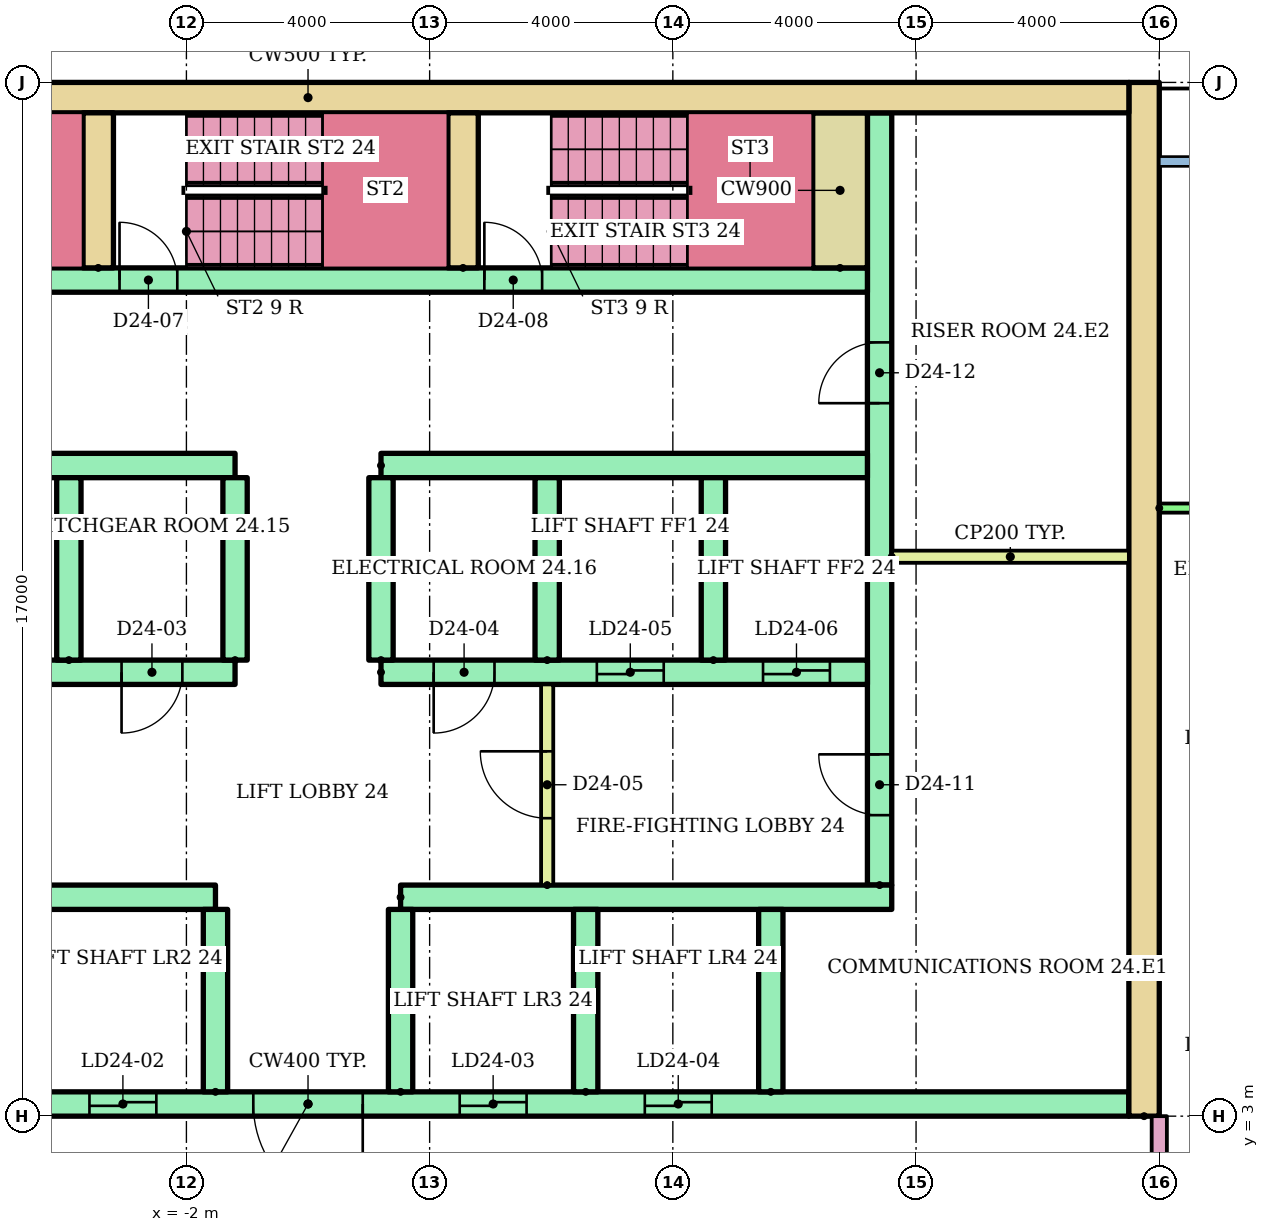
"""IFC4 building model, lengths in metres.
Left out: names, types, materials, properties, quantities, classifications, styles, units other than length and angle.
Written with IfcOpenShell. Run it as: python <this file> out.ifc"""

import sys

from ifc_helpers import new_model, si_unit, direction, frame, frame_2d, origin, place, context, subcontext, project, spatial, rectangle, extrude, element, fill, save


model = new_model("IFC4")
c1 = context("Model", 3, precision=1e-05, world=origin(), true_north=direction((0.0, 1.0)))
c2 = subcontext(c1, "Body", "Model", "MODEL_VIEW")
j1 = project(units=[si_unit("LENGTHUNIT", "METRE"), si_unit("PLANEANGLEUNIT", "RADIAN")], contexts=[c1])
p1 = place(None, origin())
s1 = spatial("IfcSite", under=j1, at=p1, CompositionType="ELEMENT")
p2 = place(p1, origin())
s2 = spatial("IfcBuilding", under=s1, at=p2, CompositionType="ELEMENT")
p3 = place(p2, frame((0.0, 0.0, 93.5)))
s3 = spatial("IfcBuildingStorey", under=s2, at=p3, CompositionType="ELEMENT", Elevation=93.5)
p4 = place(p3, frame((13.75, 3.0, 0.0), z_axis=(0.0, 0.0, 1.0), x_axis=(0.0, 1.0, 0.0)))
e1 = element("IfcWall", 1, at=p4, inside=s3, PredefinedType="SHEAR", context=c2, shape_type="SweptSolid", body=[
    extrude(rectangle(XDim=17.0, YDim=0.5, at=frame_2d((8.5, 0.0))), origin(), (0.0, 0.0, 1.0), 2.92),
])
p5 = place(p3, frame((-13.5, 19.75, 0.0)))
e2 = element("IfcWall", 2, at=p5, inside=s3, PredefinedType="SHEAR", context=c2, shape_type="SweptSolid", body=[
    extrude(rectangle(XDim=27.0, YDim=0.5, at=frame_2d((13.5, 0.0))), origin(), (0.0, 0.0, 1.0), 2.92),
])
p6 = place(p3, frame((9.4, 6.8, 0.0), z_axis=(0.0, 0.0, 1.0), x_axis=(0.0, 1.0, 0.0)))
e3 = element("IfcWall", 3, at=p6, inside=s3, PredefinedType="SHEAR", context=c2, shape_type="SweptSolid", body=[
    extrude(rectangle(XDim=12.7, YDim=0.4, at=frame_2d((6.35, 0.0))), origin(), (0.0, 0.0, 1.0), 2.92),
])
p7 = place(p6, frame((1.15, 0.0, 0.0)))
e4 = element("IfcOpeningElement", 4, at=p7, cuts=e3, PredefinedType="OPENING", context=c2, shape_type="SweptSolid", body=[
    extrude(rectangle(XDim=1.0, YDim=2.1, at=frame_2d((0.5, 1.05))), frame((0.0, 0.21, 0.0), z_axis=(0.0, -1.0, 0.0), x_axis=(1.0, 0.0, 0.0)), (0.0, 0.0, 1.0), 0.42),
])
p8 = place(p6, frame((7.925, 0.0, 0.0)))
e5 = element("IfcOpeningElement", 5, at=p8, cuts=e3, PredefinedType="OPENING", context=c2, shape_type="SweptSolid", body=[
    extrude(rectangle(XDim=1.0, YDim=2.1, at=frame_2d((0.5, 1.05))), frame((0.0, 0.21, 0.0), z_axis=(0.0, -1.0, 0.0), x_axis=(1.0, 0.0, 0.0)), (0.0, 0.0, 1.0), 0.42),
])
p9 = place(p3, frame((-13.5, 3.2, 0.0)))
e6 = element("IfcWall", 6, at=p9, inside=s3, PredefinedType="SHEAR", context=c2, shape_type="SweptSolid", body=[
    extrude(rectangle(XDim=27.0, YDim=0.4, at=frame_2d((13.5, 0.0))), origin(), (0.0, 0.0, 1.0), 2.92),
])
p10 = place(p9, frame((6.861, 0.0, 0.0)))
e7 = element("IfcOpeningElement", 7, at=p10, cuts=e6, PredefinedType="OPENING", context=c2, shape_type="SweptSolid", body=[
    extrude(rectangle(XDim=1.1, YDim=2.1, at=frame_2d((0.55, 1.05))), frame((0.0, 0.21, 0.0), z_axis=(0.0, -1.0, 0.0), x_axis=(1.0, 0.0, 0.0)), (0.0, 0.0, 1.0), 0.42),
])
p11 = place(p9, frame((9.906, 0.0, 0.0)))
e8 = element("IfcOpeningElement", 8, at=p11, cuts=e6, PredefinedType="OPENING", context=c2, shape_type="SweptSolid", body=[
    extrude(rectangle(XDim=1.1, YDim=2.1, at=frame_2d((0.55, 1.05))), frame((0.0, 0.21, 0.0), z_axis=(0.0, -1.0, 0.0), x_axis=(1.0, 0.0, 0.0)), (0.0, 0.0, 1.0), 0.42),
])
p12 = place(p9, frame((15.994, 0.0, 0.0)))
e9 = element("IfcOpeningElement", 9, at=p12, cuts=e6, PredefinedType="OPENING", context=c2, shape_type="SweptSolid", body=[
    extrude(rectangle(XDim=1.1, YDim=2.1, at=frame_2d((0.55, 1.05))), frame((0.0, 0.21, 0.0), z_axis=(0.0, -1.0, 0.0), x_axis=(1.0, 0.0, 0.0)), (0.0, 0.0, 1.0), 0.42),
])
p13 = place(p9, frame((19.039, 0.0, 0.0)))
e10 = element("IfcOpeningElement", 10, at=p13, cuts=e6, PredefinedType="OPENING", context=c2, shape_type="SweptSolid", body=[
    extrude(rectangle(XDim=1.1, YDim=2.1, at=frame_2d((0.55, 1.05))), frame((0.0, 0.21, 0.0), z_axis=(0.0, -1.0, 0.0), x_axis=(1.0, 0.0, 0.0)), (0.0, 0.0, 1.0), 0.42),
])
p14 = place(p9, frame((12.6, 0.0, 0.0)))
e11 = element("IfcOpeningElement", 11, at=p14, cuts=e6, PredefinedType="OPENING", context=c2, shape_type="SweptSolid", body=[
    extrude(rectangle(XDim=1.8, YDim=2.1, at=frame_2d((0.9, 1.05))), frame((0.0, 0.21, 0.0), z_axis=(0.0, -1.0, 0.0), x_axis=(1.0, 0.0, 0.0)), (0.0, 0.0, 1.0), 0.42),
])
p15 = place(p3, frame((-13.5, 6.6, 0.0)))
e12 = element("IfcWall", 12, at=p15, inside=s3, PredefinedType="SHEAR", context=c2, shape_type="SweptSolid", body=[
    extrude(rectangle(XDim=11.978, YDim=0.4, at=frame_2d((5.989, 0.0))), origin(), (0.0, 0.0, 1.0), 2.92),
])
p16 = place(p3, frame((1.522, 6.6, 0.0)))
e13 = element("IfcWall", 13, at=p16, inside=s3, PredefinedType="SHEAR", context=c2, shape_type="SweptSolid", body=[
    extrude(rectangle(XDim=8.078, YDim=0.4, at=frame_2d((4.039, 0.0))), origin(), (0.0, 0.0, 1.0), 2.92),
])
for number, where, z_axis, x_axis in (
    (14, (-1.522, 3.4, 0.0), (0.0, 0.0, 1.0), (0.0, 1.0, 0.0)),
    (15, (1.522, 3.4, 0.0), (0.0, 0.0, 1.0), (0.0, 1.0, 0.0)),
    (16, (4.567, 3.4, 0.0), (0.0, 0.0, 1.0), (0.0, 1.0, 0.0)),
    (17, (7.611, 3.4, 0.0), (0.0, 0.0, 1.0), (0.0, 1.0, 0.0)),
):
    element("IfcWall", number, at=place(p3, frame(where, z_axis=z_axis, x_axis=x_axis)), inside=s3, PredefinedType="SHEAR", context=c2, shape_type="SweptSolid", body=[
        extrude(rectangle(XDim=3.0, YDim=0.4, at=frame_2d((1.5, 0.0))), origin(), (0.0, 0.0, 1.0), 2.92),
    ])
p17 = place(p3, frame((-9.2, 10.3, 0.0)))
e18 = element("IfcWall", 18, at=p17, inside=s3, PredefinedType="SHEAR", context=c2, shape_type="SweptSolid", body=[
    extrude(rectangle(XDim=8.0, YDim=0.4, at=frame_2d((4.0, 0.0))), origin(), (0.0, 0.0, 1.0), 2.92),
])
p18 = place(p17, frame((2.033, 0.0, 0.0)))
e19 = element("IfcOpeningElement", 19, at=p18, cuts=e18, PredefinedType="OPENING", context=c2, shape_type="SweptSolid", body=[
    extrude(rectangle(XDim=1.0, YDim=2.1, at=frame_2d((0.5, 1.05))), frame((0.0, 0.21, 0.0), z_axis=(0.0, -1.0, 0.0), x_axis=(1.0, 0.0, 0.0)), (0.0, 0.0, 1.0), 0.42),
])
p19 = place(p17, frame((6.133, 0.0, 0.0)))
e20 = element("IfcOpeningElement", 20, at=p19, cuts=e18, PredefinedType="OPENING", context=c2, shape_type="SweptSolid", body=[
    extrude(rectangle(XDim=1.0, YDim=2.1, at=frame_2d((0.5, 1.05))), frame((0.0, 0.21, 0.0), z_axis=(0.0, -1.0, 0.0), x_axis=(1.0, 0.0, 0.0)), (0.0, 0.0, 1.0), 0.42),
])
p20 = place(p3, frame((-9.2, 13.7, 0.0)))
e21 = element("IfcWall", 21, at=p20, inside=s3, PredefinedType="SHEAR", context=c2, shape_type="SweptSolid", body=[
    extrude(rectangle(XDim=8.0, YDim=0.4, at=frame_2d((4.0, 0.0))), origin(), (0.0, 0.0, 1.0), 2.92),
])
p21 = place(p3, frame((1.2, 10.3, 0.0)))
e22 = element("IfcWall", 22, at=p21, inside=s3, PredefinedType="SHEAR", context=c2, shape_type="SweptSolid", body=[
    extrude(rectangle(XDim=8.0, YDim=0.4, at=frame_2d((4.0, 0.0))), origin(), (0.0, 0.0, 1.0), 2.92),
])
p22 = place(p21, frame((3.55, 0.0, 0.0)))
e23 = element("IfcOpeningElement", 23, at=p22, cuts=e22, PredefinedType="OPENING", context=c2, shape_type="SweptSolid", body=[
    extrude(rectangle(XDim=1.1, YDim=2.1, at=frame_2d((0.55, 1.05))), frame((0.0, 0.21, 0.0), z_axis=(0.0, -1.0, 0.0), x_axis=(1.0, 0.0, 0.0)), (0.0, 0.0, 1.0), 0.42),
])
p23 = place(p21, frame((6.283, 0.0, 0.0)))
e24 = element("IfcOpeningElement", 24, at=p23, cuts=e22, PredefinedType="OPENING", context=c2, shape_type="SweptSolid", body=[
    extrude(rectangle(XDim=1.1, YDim=2.1, at=frame_2d((0.55, 1.05))), frame((0.0, 0.21, 0.0), z_axis=(0.0, -1.0, 0.0), x_axis=(1.0, 0.0, 0.0)), (0.0, 0.0, 1.0), 0.42),
])
p24 = place(p21, frame((0.867, 0.0, 0.0)))
e25 = element("IfcOpeningElement", 25, at=p24, cuts=e22, PredefinedType="OPENING", context=c2, shape_type="SweptSolid", body=[
    extrude(rectangle(XDim=1.0, YDim=2.1, at=frame_2d((0.5, 1.05))), frame((0.0, 0.21, 0.0), z_axis=(0.0, -1.0, 0.0), x_axis=(1.0, 0.0, 0.0)), (0.0, 0.0, 1.0), 0.42),
])
p25 = place(p3, frame((1.2, 13.7, 0.0)))
e26 = element("IfcWall", 26, at=p25, inside=s3, PredefinedType="SHEAR", context=c2, shape_type="SweptSolid", body=[
    extrude(rectangle(XDim=8.0, YDim=0.4, at=frame_2d((4.0, 0.0))), origin(), (0.0, 0.0, 1.0), 2.92),
])
for number, where, z_axis, x_axis in (
    (27, (-3.933, 10.5, 0.0), (0.0, 0.0, 1.0), (0.0, 1.0, 0.0)),
    (28, (-1.2, 10.5, 0.0), (0.0, 0.0, 1.0), (0.0, 1.0, 0.0)),
    (29, (1.2, 10.5, 0.0), (0.0, 0.0, 1.0), (0.0, 1.0, 0.0)),
    (30, (3.933, 10.5, 0.0), (0.0, 0.0, 1.0), (0.0, 1.0, 0.0)),
    (31, (6.667, 10.5, 0.0), (0.0, 0.0, 1.0), (0.0, 1.0, 0.0)),
):
    element("IfcWall", number, at=place(p3, frame(where, z_axis=z_axis, x_axis=x_axis)), inside=s3, PredefinedType="SHEAR", context=c2, shape_type="SweptSolid", body=[
        extrude(rectangle(XDim=3.0, YDim=0.4, at=frame_2d((1.5, 0.0))), origin(), (0.0, 0.0, 1.0), 2.92),
    ])
p26 = place(p3, frame((3.933, 6.8, 0.0), z_axis=(0.0, 0.0, 1.0), x_axis=(0.0, 1.0, 0.0)))
e32 = element("IfcWall", 32, at=p26, inside=s3, PredefinedType="PARTITIONING", context=c2, shape_type="SweptSolid", body=[
    extrude(rectangle(XDim=3.3, YDim=0.2, at=frame_2d((1.65, 0.0))), origin(), (0.0, 0.0, 1.0), 2.92),
])
p27 = place(p26, frame((1.1, 0.0, 0.0)))
e33 = element("IfcOpeningElement", 33, at=p27, cuts=e32, PredefinedType="OPENING", context=c2, shape_type="SweptSolid", body=[
    extrude(rectangle(XDim=1.1, YDim=2.1, at=frame_2d((0.55, 1.05))), frame((0.0, 0.11, 0.0), z_axis=(0.0, -1.0, 0.0), x_axis=(1.0, 0.0, 0.0)), (0.0, 0.0, 1.0), 0.22),
])
p28 = place(p3, frame((-9.2, 16.75, 0.0)))
e34 = element("IfcWall", 34, at=p28, inside=s3, PredefinedType="SHEAR", context=c2, shape_type="SweptSolid", body=[
    extrude(rectangle(XDim=18.4, YDim=0.4, at=frame_2d((9.2, 0.0))), origin(), (0.0, 0.0, 1.0), 2.92),
])
p29 = place(p28, frame((0.1, 0.0, 0.0)))
e35 = element("IfcOpeningElement", 35, at=p29, cuts=e34, PredefinedType="OPENING", context=c2, shape_type="SweptSolid", body=[
    extrude(rectangle(XDim=0.95, YDim=2.1, at=frame_2d((0.475, 1.05))), frame((0.0, 0.21, 0.0), z_axis=(0.0, -1.0, 0.0), x_axis=(1.0, 0.0, 0.0)), (0.0, 0.0, 1.0), 0.42),
])
p30 = place(p28, frame((6.1, 0.0, 0.0)))
e36 = element("IfcOpeningElement", 36, at=p30, cuts=e34, PredefinedType="OPENING", context=c2, shape_type="SweptSolid", body=[
    extrude(rectangle(XDim=0.95, YDim=2.1, at=frame_2d((0.475, 1.05))), frame((0.0, 0.21, 0.0), z_axis=(0.0, -1.0, 0.0), x_axis=(1.0, 0.0, 0.0)), (0.0, 0.0, 1.0), 0.42),
])
p31 = place(p28, frame((12.1, 0.0, 0.0)))
e37 = element("IfcOpeningElement", 37, at=p31, cuts=e34, PredefinedType="OPENING", context=c2, shape_type="SweptSolid", body=[
    extrude(rectangle(XDim=0.95, YDim=2.1, at=frame_2d((0.475, 1.05))), frame((0.0, 0.21, 0.0), z_axis=(0.0, -1.0, 0.0), x_axis=(1.0, 0.0, 0.0)), (0.0, 0.0, 1.0), 0.42),
])
for number, where, z_axis, x_axis in (
    (38, (-3.45, 16.95, 0.0), (0.0, 0.0, 1.0), (0.0, 1.0, 0.0)),
    (39, (2.55, 16.95, 0.0), (0.0, 0.0, 1.0), (0.0, 1.0, 0.0)),
):
    element("IfcWall", number, at=place(p3, frame(where, z_axis=z_axis, x_axis=x_axis)), inside=s3, PredefinedType="SHEAR", context=c2, shape_type="SweptSolid", body=[
        extrude(rectangle(XDim=2.55, YDim=0.5, at=frame_2d((1.275, 0.0))), origin(), (0.0, 0.0, 1.0), 2.92),
    ])
p32 = place(p3, frame((8.75, 16.95, 0.0), z_axis=(0.0, 0.0, 1.0), x_axis=(0.0, 1.0, 0.0)))
e40 = element("IfcWall", 40, at=p32, inside=s3, PredefinedType="SHEAR", context=c2, shape_type="SweptSolid", body=[
    extrude(rectangle(XDim=2.55, YDim=0.9, at=frame_2d((1.275, 0.0))), origin(), (0.0, 0.0, 1.0), 2.92),
])
p33 = place(p3, frame((9.6, 12.2, 0.0)))
e41 = element("IfcWall", 41, at=p33, inside=s3, PredefinedType="PARTITIONING", context=c2, shape_type="SweptSolid", body=[
    extrude(rectangle(XDim=3.9, YDim=0.2, at=frame_2d((1.95, 0.0))), origin(), (0.0, 0.0, 1.0), 2.92),
])
p34 = place(p3, frame((14.0, 13.0, 0.0)))
e42 = element("IfcWall", 42, at=p34, inside=s3, PredefinedType="PARTITIONING", context=c2, shape_type="SweptSolid", body=[
    extrude(rectangle(XDim=12.0, YDim=0.15, at=frame_2d((6.0, 0.0))), origin(), (0.0, 0.0, 1.0), 2.4),
])
p35 = place(p34, frame((1.5, 0.0, 0.0)))
e43 = element("IfcOpeningElement", 43, at=p35, cuts=e42, PredefinedType="OPENING", context=c2, shape_type="SweptSolid", body=[
    extrude(rectangle(XDim=1.0, YDim=2.1, at=frame_2d((0.5, 1.05))), frame((0.0, 0.085, 0.0), z_axis=(0.0, -1.0, 0.0), x_axis=(1.0, 0.0, 0.0)), (0.0, 0.0, 1.0), 0.17),
])
p36 = place(p34, frame((7.5, 0.0, 0.0)))
e44 = element("IfcOpeningElement", 44, at=p36, cuts=e42, PredefinedType="OPENING", context=c2, shape_type="SweptSolid", body=[
    extrude(rectangle(XDim=1.0, YDim=2.1, at=frame_2d((0.5, 1.05))), frame((0.0, 0.085, 0.0), z_axis=(0.0, -1.0, 0.0), x_axis=(1.0, 0.0, 0.0)), (0.0, 0.0, 1.0), 0.17),
])
p37 = place(p3, frame((14.0, 1.4, 0.0), z_axis=(0.0, 0.0, 1.0), x_axis=(0.0, 1.0, 0.0)))
e45 = element("IfcWall", 45, at=p37, inside=s3, PredefinedType="PARTITIONING", context=c2, shape_type="SweptSolid", body=[
    extrude(rectangle(XDim=1.6, YDim=0.25, at=frame_2d((0.8, 0.0))), origin(), (0.0, 0.0, 1.0), 2.4),
])
p38 = place(p11, origin())
e46 = element("IfcDoor", 46, at=p38, inside=s3, OperationType="SLIDING_TO_LEFT", PredefinedType="DOOR", context=c2, shape_type="SweptSolid", body=[
    extrude(rectangle(XDim=1.1, YDim=2.1, at=frame_2d((0.55, 1.05))), frame((0.0, 0.025, 0.0), z_axis=(0.0, -1.0, 0.0), x_axis=(1.0, 0.0, 0.0)), (0.0, 0.0, 1.0), 0.05),
])
fill(e8, e46)
p39 = place(p12, origin())
e47 = element("IfcDoor", 47, at=p39, inside=s3, OperationType="SLIDING_TO_LEFT", PredefinedType="DOOR", context=c2, shape_type="SweptSolid", body=[
    extrude(rectangle(XDim=1.1, YDim=2.1, at=frame_2d((0.55, 1.05))), frame((0.0, 0.025, 0.0), z_axis=(0.0, -1.0, 0.0), x_axis=(1.0, 0.0, 0.0)), (0.0, 0.0, 1.0), 0.05),
])
fill(e9, e47)
p40 = place(p13, origin())
e48 = element("IfcDoor", 48, at=p40, inside=s3, OperationType="SLIDING_TO_LEFT", PredefinedType="DOOR", context=c2, shape_type="SweptSolid", body=[
    extrude(rectangle(XDim=1.1, YDim=2.1, at=frame_2d((0.55, 1.05))), frame((0.0, 0.025, 0.0), z_axis=(0.0, -1.0, 0.0), x_axis=(1.0, 0.0, 0.0)), (0.0, 0.0, 1.0), 0.05),
])
fill(e10, e48)
p41 = place(p14, frame((1.8, 0.0, 0.0), z_axis=(0.0, 0.0, 1.0), x_axis=(-1.0, 0.0, 0.0)))
e49 = element("IfcDoor", 49, at=p41, inside=s3, OperationType="DOUBLE_DOOR_SINGLE_SWING", PredefinedType="DOOR", context=c2, shape_type="SweptSolid", body=[
    extrude(rectangle(XDim=1.8, YDim=2.1, at=frame_2d((0.9, 1.05))), frame((0.0, 0.025, 0.0), z_axis=(0.0, -1.0, 0.0), x_axis=(1.0, 0.0, 0.0)), (0.0, 0.0, 1.0), 0.05),
])
fill(e11, e49)
p42 = place(p22, origin())
e50 = element("IfcDoor", 50, at=p42, inside=s3, OperationType="SLIDING_TO_LEFT", PredefinedType="DOOR", context=c2, shape_type="SweptSolid", body=[
    extrude(rectangle(XDim=1.1, YDim=2.1, at=frame_2d((0.55, 1.05))), frame((0.0, 0.025, 0.0), z_axis=(0.0, -1.0, 0.0), x_axis=(1.0, 0.0, 0.0)), (0.0, 0.0, 1.0), 0.05),
])
fill(e23, e50)
p43 = place(p23, origin())
e51 = element("IfcDoor", 51, at=p43, inside=s3, OperationType="SLIDING_TO_LEFT", PredefinedType="DOOR", context=c2, shape_type="SweptSolid", body=[
    extrude(rectangle(XDim=1.1, YDim=2.1, at=frame_2d((0.55, 1.05))), frame((0.0, 0.025, 0.0), z_axis=(0.0, -1.0, 0.0), x_axis=(1.0, 0.0, 0.0)), (0.0, 0.0, 1.0), 0.05),
])
fill(e24, e51)
p44 = place(p19, frame((1.0, 0.0, 0.0), z_axis=(0.0, 0.0, 1.0), x_axis=(-1.0, 0.0, 0.0)))
e52 = element("IfcDoor", 52, at=p44, inside=s3, OperationType="SINGLE_SWING_LEFT", PredefinedType="DOOR", context=c2, shape_type="SweptSolid", body=[
    extrude(rectangle(XDim=1.0, YDim=2.1, at=frame_2d((0.5, 1.05))), frame((0.0, 0.025, 0.0), z_axis=(0.0, -1.0, 0.0), x_axis=(1.0, 0.0, 0.0)), (0.0, 0.0, 1.0), 0.05),
])
fill(e20, e52)
p45 = place(p24, frame((1.0, 0.0, 0.0), z_axis=(0.0, 0.0, 1.0), x_axis=(-1.0, 0.0, 0.0)))
e53 = element("IfcDoor", 53, at=p45, inside=s3, OperationType="SINGLE_SWING_LEFT", PredefinedType="DOOR", context=c2, shape_type="SweptSolid", body=[
    extrude(rectangle(XDim=1.0, YDim=2.1, at=frame_2d((0.5, 1.05))), frame((0.0, 0.025, 0.0), z_axis=(0.0, -1.0, 0.0), x_axis=(1.0, 0.0, 0.0)), (0.0, 0.0, 1.0), 0.05),
])
fill(e25, e53)
p46 = place(p27, origin())
e54 = element("IfcDoor", 54, at=p46, inside=s3, OperationType="SINGLE_SWING_RIGHT", PredefinedType="DOOR", context=c2, shape_type="SweptSolid", body=[
    extrude(rectangle(XDim=1.1, YDim=2.1, at=frame_2d((0.55, 1.05))), frame((0.0, 0.025, 0.0), z_axis=(0.0, -1.0, 0.0), x_axis=(1.0, 0.0, 0.0)), (0.0, 0.0, 1.0), 0.05),
])
fill(e33, e54)
p47 = place(p30, origin())
e55 = element("IfcDoor", 55, at=p47, inside=s3, OperationType="SINGLE_SWING_LEFT", PredefinedType="DOOR", context=c2, shape_type="SweptSolid", body=[
    extrude(rectangle(XDim=0.95, YDim=2.1, at=frame_2d((0.475, 1.05))), frame((0.0, 0.025, 0.0), z_axis=(0.0, -1.0, 0.0), x_axis=(1.0, 0.0, 0.0)), (0.0, 0.0, 1.0), 0.05),
])
fill(e36, e55)
p48 = place(p31, origin())
e56 = element("IfcDoor", 56, at=p48, inside=s3, OperationType="SINGLE_SWING_LEFT", PredefinedType="DOOR", context=c2, shape_type="SweptSolid", body=[
    extrude(rectangle(XDim=0.95, YDim=2.1, at=frame_2d((0.475, 1.05))), frame((0.0, 0.025, 0.0), z_axis=(0.0, -1.0, 0.0), x_axis=(1.0, 0.0, 0.0)), (0.0, 0.0, 1.0), 0.05),
])
fill(e37, e56)
p49 = place(p7, origin())
e57 = element("IfcDoor", 57, at=p49, inside=s3, OperationType="SINGLE_SWING_RIGHT", PredefinedType="DOOR", context=c2, shape_type="SweptSolid", body=[
    extrude(rectangle(XDim=1.0, YDim=2.1, at=frame_2d((0.5, 1.05))), frame((0.0, 0.025, 0.0), z_axis=(0.0, -1.0, 0.0), x_axis=(1.0, 0.0, 0.0)), (0.0, 0.0, 1.0), 0.05),
])
fill(e4, e57)
p50 = place(p8, origin())
e58 = element("IfcDoor", 58, at=p50, inside=s3, OperationType="SINGLE_SWING_LEFT", PredefinedType="DOOR", context=c2, shape_type="SweptSolid", body=[
    extrude(rectangle(XDim=1.0, YDim=2.1, at=frame_2d((0.5, 1.05))), frame((0.0, 0.025, 0.0), z_axis=(0.0, -1.0, 0.0), x_axis=(1.0, 0.0, 0.0)), (0.0, 0.0, 1.0), 0.05),
])
fill(e5, e58)
save(model, sys.argv[1])
